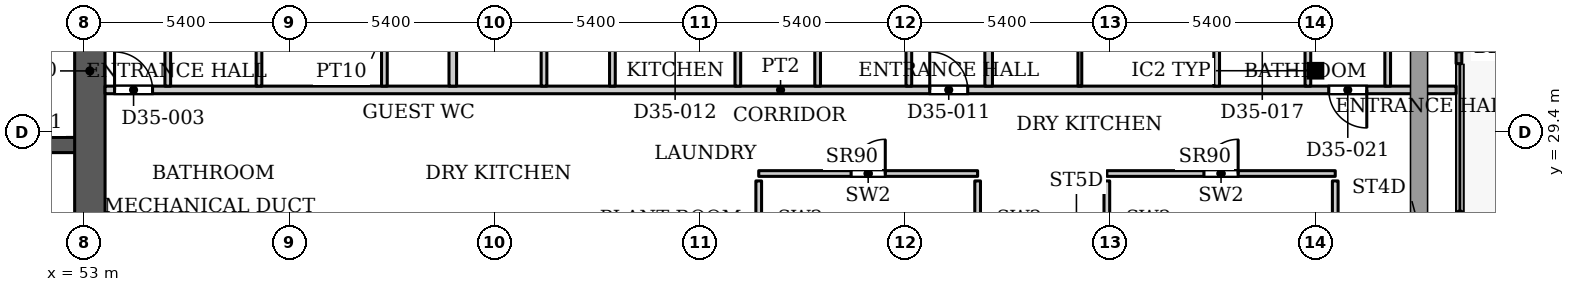
"""IFC4 building model, lengths in metres.
Left out: names, types, materials, properties, quantities, classifications, styles, units other than length and angle.
Written with IfcOpenShell. Run it as: python <this file> out.ifc"""

import sys

from ifc_helpers import new_model, si_unit, direction, frame, frame_2d, origin, origin_2d, place, context, subcontext, project, spatial, rectangle, hollow_rectangle, extrude, source, transform, mapped, element, fill, save


model = new_model("IFC4")
c1 = context("Model", 3, precision=1e-05, world=origin(), true_north=direction((0.0, 1.0)))
c2 = subcontext(c1, "Body", "Model", "MODEL_VIEW")
j1 = project(units=[si_unit("LENGTHUNIT", "METRE"), si_unit("PLANEANGLEUNIT", "RADIAN")], contexts=[c1])
p1 = place(None, origin())
s1 = spatial("IfcSite", under=j1, at=p1, CompositionType="ELEMENT")
p2 = place(p1, origin())
s2 = spatial("IfcBuilding", under=s1, at=p2, CompositionType="ELEMENT")
p3 = place(p2, frame((0.0, 0.0, 156.5)))
s3 = spatial("IfcBuildingStorey", under=s2, at=p3, CompositionType="ELEMENT", Elevation=156.5)
p4 = place(p3, frame((85.4, 31.005, 0.0), z_axis=(0.0, 0.0, 1.0), x_axis=(1.0, 0.0, 0.0)))
e1 = element("IfcColumn", 1, at=p4, inside=s3, PredefinedType="COLUMN", context=c2, shape_type="SweptSolid", body=[
    extrude(hollow_rectangle(XDim=0.305, YDim=0.305, WallThickness=0.016, InnerFilletRadius=0.016, OuterFilletRadius=0.032, at=origin_2d()), origin(), (0.0, 0.0, 1.0), 3.9),
])
p5 = place(p3, frame((34.75, 29.05, 0.0), z_axis=(0.0, 0.0, 1.0), x_axis=(1.0, 0.0, 0.0)))
e2 = element("IfcWall", 2, at=p5, inside=s3, PredefinedType="SHEAR", context=c2, shape_type="SweptSolid", body=[
    extrude(rectangle(XDim=18.4, YDim=0.4, at=frame_2d((9.2, 0.0))), origin(), (0.0, 0.0, 1.0), 3.9),
])
p6 = place(p5, frame((0.875, 0.0, 0.0)))
e3 = element("IfcOpeningElement", 3, at=p6, cuts=e2, PredefinedType="OPENING", context=c2, shape_type="SweptSolid", body=[
    extrude(rectangle(XDim=1.1, YDim=2.2, at=frame_2d((0.55, 1.1))), frame((0.0, 0.21, 0.0), z_axis=(0.0, -1.0, 0.0), x_axis=(1.0, 0.0, 0.0)), (0.0, 0.0, 1.0), 0.42),
])
p7 = place(p5, frame((3.725, 0.0, 0.0)))
e4 = element("IfcOpeningElement", 4, at=p7, cuts=e2, PredefinedType="OPENING", context=c2, shape_type="SweptSolid", body=[
    extrude(rectangle(XDim=1.1, YDim=2.2, at=frame_2d((0.55, 1.1))), frame((0.0, 0.21, 0.0), z_axis=(0.0, -1.0, 0.0), x_axis=(1.0, 0.0, 0.0)), (0.0, 0.0, 1.0), 0.42),
])
p8 = place(p5, frame((6.575, 0.0, 0.0)))
e5 = element("IfcOpeningElement", 5, at=p8, cuts=e2, PredefinedType="OPENING", context=c2, shape_type="SweptSolid", body=[
    extrude(rectangle(XDim=1.1, YDim=2.2, at=frame_2d((0.55, 1.1))), frame((0.0, 0.21, 0.0), z_axis=(0.0, -1.0, 0.0), x_axis=(1.0, 0.0, 0.0)), (0.0, 0.0, 1.0), 0.42),
])
p9 = place(p5, frame((9.425, 0.0, 0.0)))
e6 = element("IfcOpeningElement", 6, at=p9, cuts=e2, PredefinedType="OPENING", context=c2, shape_type="SweptSolid", body=[
    extrude(rectangle(XDim=1.1, YDim=2.2, at=frame_2d((0.55, 1.1))), frame((0.0, 0.21, 0.0), z_axis=(0.0, -1.0, 0.0), x_axis=(1.0, 0.0, 0.0)), (0.0, 0.0, 1.0), 0.42),
])
p10 = place(p5, frame((12.275, 0.0, 0.0)))
e7 = element("IfcOpeningElement", 7, at=p10, cuts=e2, PredefinedType="OPENING", context=c2, shape_type="SweptSolid", body=[
    extrude(rectangle(XDim=1.1, YDim=2.2, at=frame_2d((0.55, 1.1))), frame((0.0, 0.21, 0.0), z_axis=(0.0, -1.0, 0.0), x_axis=(1.0, 0.0, 0.0)), (0.0, 0.0, 1.0), 0.42),
])
p11 = place(p5, frame((15.125, 0.0, 0.0)))
e8 = element("IfcOpeningElement", 8, at=p11, cuts=e2, PredefinedType="OPENING", context=c2, shape_type="SweptSolid", body=[
    extrude(rectangle(XDim=1.1, YDim=2.2, at=frame_2d((0.55, 1.1))), frame((0.0, 0.21, 0.0), z_axis=(0.0, -1.0, 0.0), x_axis=(1.0, 0.0, 0.0)), (0.0, 0.0, 1.0), 0.42),
])
p12 = place(p3, frame((53.15, 25.8, 0.0), z_axis=(0.0, 0.0, 1.0), x_axis=(0.0, 1.0, 0.0)))
e9 = element("IfcWall", 9, at=p12, inside=s3, PredefinedType="SHEAR", context=c2, shape_type="SweptSolid", body=[
    extrude(rectangle(XDim=10.4, YDim=0.8, at=frame_2d((5.2, 0.0))), origin(), (0.0, 0.0, 1.0), 3.9),
])
p13 = place(p3, frame((89.175, 33.591, 0.0), z_axis=(0.0, 0.0, 1.0), x_axis=(0.0, -1.0, 0.0)))
e10 = element("IfcWall", 10, at=p13, inside=s3, PredefinedType="SOLIDWALL", context=c2, shape_type="SweptSolid", body=[
    extrude(rectangle(XDim=2.4, YDim=0.15, at=frame_2d((1.2, 0.0))), origin(), (0.0, 0.0, 1.0), 3.75),
])
p14 = place(p13, frame((0.3, 0.0, 0.0)))
e11 = element("IfcOpeningElement", 11, at=p14, cuts=e10, PredefinedType="OPENING", context=c2, shape_type="SweptSolid", body=[
    extrude(rectangle(XDim=1.8, YDim=2.4, at=frame_2d((0.9, 1.2))), frame((0.0, 0.085, 0.0), z_axis=(0.0, -1.0, 0.0), x_axis=(1.0, 0.0, 0.0)), (0.0, 0.0, 1.0), 0.17),
])
p15 = place(p3, frame((70.75, 28.3, 0.0), z_axis=(0.0, 0.0, 1.0), x_axis=(1.0, 0.0, 0.0)))
e12 = element("IfcWall", 12, at=p15, inside=s3, PredefinedType="PARTITIONING", context=c2, shape_type="SweptSolid", body=[
    extrude(rectangle(XDim=5.76, YDim=0.15, at=frame_2d((2.88, 0.0))), origin(), (0.0, 0.0, 1.0), 3.9),
])
p16 = place(p15, frame((2.43, 0.0, 0.0)))
e13 = element("IfcOpeningElement", 13, at=p16, cuts=e12, PredefinedType="OPENING", context=c2, shape_type="SweptSolid", body=[
    extrude(rectangle(XDim=0.9, YDim=2.2, at=frame_2d((0.45, 1.1))), frame((0.0, 0.085, 0.0), z_axis=(0.0, -1.0, 0.0), x_axis=(1.0, 0.0, 0.0)), (0.0, 0.0, 1.0), 0.17),
])
for number, where, z_axis, x_axis in (
    (14, (70.75, 26.12, 0.0), (0.0, 0.0, 1.0), (0.0, 1.0, 0.0)),
    (15, (76.51, 26.12, 0.0), (0.0, 0.0, 1.0), (0.0, 1.0, 0.0)),
):
    element("IfcWall", number, at=place(p3, frame(where, z_axis=z_axis, x_axis=x_axis)), inside=s3, PredefinedType="PARTITIONING", context=c2, shape_type="SweptSolid", body=[
        extrude(rectangle(XDim=1.985, YDim=0.15, at=frame_2d((0.992, 0.0))), origin(), (0.0, 0.0, 1.0), 3.9),
    ])
p17 = place(p3, frame((79.91, 28.3, 0.0), z_axis=(0.0, 0.0, 1.0), x_axis=(1.0, 0.0, 0.0)))
e16 = element("IfcWall", 16, at=p17, inside=s3, PredefinedType="PARTITIONING", context=c2, shape_type="SweptSolid", body=[
    extrude(rectangle(XDim=6.01, YDim=0.15, at=frame_2d((3.005, 0.0))), origin(), (0.0, 0.0, 1.0), 3.9),
])
p18 = place(p17, frame((2.555, 0.0, 0.0)))
e17 = element("IfcOpeningElement", 17, at=p18, cuts=e16, PredefinedType="OPENING", context=c2, shape_type="SweptSolid", body=[
    extrude(rectangle(XDim=0.9, YDim=2.2, at=frame_2d((0.45, 1.1))), frame((0.0, 0.085, 0.0), z_axis=(0.0, -1.0, 0.0), x_axis=(1.0, 0.0, 0.0)), (0.0, 0.0, 1.0), 0.17),
])
p19 = place(p3, frame((79.91, 26.12, 0.0), z_axis=(0.0, 0.0, 1.0), x_axis=(0.0, 1.0, 0.0)))
e18 = element("IfcWall", 18, at=p19, inside=s3, PredefinedType="PARTITIONING", context=c2, shape_type="SweptSolid", body=[
    extrude(rectangle(XDim=1.985, YDim=0.15, at=frame_2d((0.992, 0.0))), origin(), (0.0, 0.0, 1.0), 3.9),
])
p20 = place(p3, frame((85.92, 25.62, 0.0), z_axis=(0.0, 0.0, 1.0), x_axis=(0.0, 1.0, 0.0)))
e19 = element("IfcWall", 19, at=p20, inside=s3, PredefinedType="PARTITIONING", context=c2, shape_type="SweptSolid", body=[
    extrude(rectangle(XDim=2.485, YDim=0.15, at=frame_2d((1.242, 0.0))), origin(), (0.0, 0.0, 1.0), 3.9),
])
p21 = place(p3, frame((53.549, 30.5, 0.0), z_axis=(0.0, 0.0, 1.0), x_axis=(1.0, 0.0, 0.0)))
e20 = element("IfcWall", 20, at=p21, inside=s3, PredefinedType="PARTITIONING", context=c2, shape_type="SweptSolid", body=[
    extrude(rectangle(XDim=35.551, YDim=0.2, at=frame_2d((17.775, 0.0))), origin(), (0.0, 0.0, 1.0), 3.6),
])
p22 = place(p21, frame((0.251, 0.0, 0.0)))
e21 = element("IfcOpeningElement", 21, at=p22, cuts=e20, PredefinedType="OPENING", context=c2, shape_type="SweptSolid", body=[
    extrude(rectangle(XDim=1.0, YDim=2.1, at=frame_2d((0.5, 1.05))), frame((0.0, 0.11, 0.0), z_axis=(0.0, -1.0, 0.0), x_axis=(1.0, 0.0, 0.0)), (0.0, 0.0, 1.0), 0.22),
])
p23 = place(p21, frame((21.701, 0.0, 0.0)))
e22 = element("IfcOpeningElement", 22, at=p23, cuts=e20, PredefinedType="OPENING", context=c2, shape_type="SweptSolid", body=[
    extrude(rectangle(XDim=1.0, YDim=2.1, at=frame_2d((0.5, 1.05))), frame((0.0, 0.11, 0.0), z_axis=(0.0, -1.0, 0.0), x_axis=(1.0, 0.0, 0.0)), (0.0, 0.0, 1.0), 0.22),
])
p24 = place(p21, frame((32.201, 0.0, 0.0)))
e23 = element("IfcOpeningElement", 23, at=p24, cuts=e20, PredefinedType="OPENING", context=c2, shape_type="SweptSolid", body=[
    extrude(rectangle(XDim=1.0, YDim=2.1, at=frame_2d((0.5, 1.05))), frame((0.0, 0.11, 0.0), z_axis=(0.0, -1.0, 0.0), x_axis=(1.0, 0.0, 0.0)), (0.0, 0.0, 1.0), 0.22),
])
for number, where, z_axis, x_axis in (
    (24, (55.2, 30.6, 0.0), (0.0, 0.0, 1.0), (0.0, 1.0, 0.0)),
    (25, (57.6, 30.6, 0.0), (0.0, 0.0, 1.0), (0.0, 1.0, 0.0)),
    (26, (60.9, 30.6, 0.0), (0.0, 0.0, 1.0), (0.0, 1.0, 0.0)),
):
    element("IfcWall", number, at=place(p3, frame(where, z_axis=z_axis, x_axis=x_axis)), inside=s3, PredefinedType="PARTITIONING", context=c2, shape_type="SweptSolid", body=[
        extrude(rectangle(XDim=3.025, YDim=0.15, at=frame_2d((1.512, 0.0))), origin(), (0.0, 0.0, 1.0), 3.6),
    ])
p25 = place(p3, frame((62.7, 30.6, 0.0), z_axis=(0.0, 0.0, 1.0), x_axis=(0.0, 1.0, 0.0)))
e27 = element("IfcWall", 27, at=p25, inside=s3, PredefinedType="PARTITIONING", context=c2, shape_type="SweptSolid", body=[
    extrude(rectangle(XDim=13.3, YDim=0.2, at=frame_2d((6.65, 0.0))), origin(), (0.0, 0.0, 1.0), 3.6),
])
for number, where, z_axis, x_axis in (
    (28, (65.1, 30.6, 0.0), (0.0, 0.0, 1.0), (0.0, 1.0, 0.0)),
    (29, (66.9, 30.6, 0.0), (0.0, 0.0, 1.0), (0.0, 1.0, 0.0)),
    (30, (70.2, 30.6, 0.0), (0.0, 0.0, 1.0), (0.0, 1.0, 0.0)),
    (31, (72.3, 30.6, 0.0), (0.0, 0.0, 1.0), (0.0, 1.0, 0.0)),
    (32, (74.7, 30.6, 0.0), (0.0, 0.0, 1.0), (0.0, 1.0, 0.0)),
):
    element("IfcWall", number, at=place(p3, frame(where, z_axis=z_axis, x_axis=x_axis)), inside=s3, PredefinedType="PARTITIONING", context=c2, shape_type="SweptSolid", body=[
        extrude(rectangle(XDim=3.025, YDim=0.15, at=frame_2d((1.512, 0.0))), origin(), (0.0, 0.0, 1.0), 3.6),
    ])
p26 = place(p3, frame((76.8, 30.6, 0.0), z_axis=(0.0, 0.0, 1.0), x_axis=(0.0, 1.0, 0.0)))
e33 = element("IfcWall", 33, at=p26, inside=s3, PredefinedType="PARTITIONING", context=c2, shape_type="SweptSolid", body=[
    extrude(rectangle(XDim=13.3, YDim=0.2, at=frame_2d((6.65, 0.0))), origin(), (0.0, 0.0, 1.0), 3.6),
])
p27 = place(p3, frame((79.2, 30.6, 0.0), z_axis=(0.0, 0.0, 1.0), x_axis=(0.0, 1.0, 0.0)))
e34 = element("IfcWall", 34, at=p27, inside=s3, PredefinedType="PARTITIONING", context=c2, shape_type="SweptSolid", body=[
    extrude(rectangle(XDim=3.025, YDim=0.1, at=frame_2d((1.512, 0.0))), origin(), (0.0, 0.0, 1.0), 3.6),
])
p28 = place(p3, frame((82.8, 30.6, 0.0), z_axis=(0.0, 0.0, 1.0), x_axis=(0.0, 1.0, 0.0)))
e35 = element("IfcWall", 35, at=p28, inside=s3, PredefinedType="PARTITIONING", context=c2, shape_type="SweptSolid", body=[
    extrude(rectangle(XDim=3.025, YDim=0.15, at=frame_2d((1.512, 0.0))), origin(), (0.0, 0.0, 1.0), 3.6),
])
p29 = place(p3, frame((85.2, 30.6, 0.0), z_axis=(0.0, 0.0, 1.0), x_axis=(0.0, 1.0, 0.0)))
e36 = element("IfcWall", 36, at=p29, inside=s3, PredefinedType="PARTITIONING", context=c2, shape_type="SweptSolid", body=[
    extrude(rectangle(XDim=3.025, YDim=0.15, at=frame_2d((1.512, 0.0))), origin(), (0.0, 0.0, 1.0), 3.447),
])
p30 = place(p3, frame((87.3, 30.6, 0.0), z_axis=(0.0, 0.0, 1.0), x_axis=(0.0, 1.0, 0.0)))
e37 = element("IfcWall", 37, at=p30, inside=s3, PredefinedType="PARTITIONING", context=c2, shape_type="SweptSolid", body=[
    extrude(rectangle(XDim=3.175, YDim=0.15, at=frame_2d((1.587, 0.0))), origin(), (0.0, 0.0, 1.0), 3.6),
])
m1 = source(origin(), c2, "Body", "SweptSolid", [
    extrude(rectangle(XDim=1.8, YDim=2.4, at=frame_2d((0.9, 1.2))), frame((0.0, 0.025, 0.0), z_axis=(0.0, -1.0, 0.0), x_axis=(1.0, 0.0, 0.0)), (0.0, 0.0, 1.0), 0.05),
])
p31 = place(p14, origin())
e38 = element("IfcDoor", 38, at=p31, inside=s3, OperationType="SLIDING_TO_LEFT", PredefinedType="DOOR", context=c2, shape_type="MappedRepresentation", body=[
    mapped(m1, transform((0.0, 0.0, 0.0), x_axis=(1.0, 0.0, 0.0), y_axis=(0.0, 1.0, 0.0), z_axis=(0.0, 0.0, 1.0), scale=1.0)),
])
fill(e11, e38)
m2 = source(origin(), c2, "Body", "SweptSolid", [
    extrude(rectangle(XDim=0.9, YDim=2.2, at=frame_2d((0.45, 1.1))), frame((0.0, 0.025, 0.0), z_axis=(0.0, -1.0, 0.0), x_axis=(1.0, 0.0, 0.0)), (0.0, 0.0, 1.0), 0.05),
])
p32 = place(p16, origin())
e39 = element("IfcDoor", 39, at=p32, inside=s3, OperationType="SINGLE_SWING_LEFT", PredefinedType="DOOR", context=c2, shape_type="MappedRepresentation", body=[
    mapped(m2, transform((0.0, 0.0, 0.0), x_axis=(1.0, 0.0, 0.0), y_axis=(0.0, 1.0, 0.0), z_axis=(0.0, 0.0, 1.0), scale=1.0)),
])
fill(e13, e39)
p33 = place(p18, origin())
e40 = element("IfcDoor", 40, at=p33, inside=s3, OperationType="SINGLE_SWING_LEFT", PredefinedType="DOOR", context=c2, shape_type="MappedRepresentation", body=[
    mapped(m2, transform((0.0, 0.0, 0.0), x_axis=(1.0, 0.0, 0.0), y_axis=(0.0, 1.0, 0.0), z_axis=(0.0, 0.0, 1.0), scale=1.0)),
])
fill(e17, e40)
m3 = source(origin(), c2, "Body", "SweptSolid", [
    extrude(rectangle(XDim=1.0, YDim=2.1, at=frame_2d((0.5, 1.05))), frame((0.0, 0.025, 0.0), z_axis=(0.0, -1.0, 0.0), x_axis=(1.0, 0.0, 0.0)), (0.0, 0.0, 1.0), 0.05),
])
p34 = place(p22, origin())
e41 = element("IfcDoor", 41, at=p34, inside=s3, OperationType="SINGLE_SWING_LEFT", PredefinedType="DOOR", context=c2, shape_type="MappedRepresentation", body=[
    mapped(m3, transform((0.0, 0.0, 0.0), x_axis=(1.0, 0.0, 0.0), y_axis=(0.0, 1.0, 0.0), z_axis=(0.0, 0.0, 1.0), scale=1.0)),
])
fill(e21, e41)
p35 = place(p23, origin())
e42 = element("IfcDoor", 42, at=p35, inside=s3, OperationType="SINGLE_SWING_LEFT", PredefinedType="DOOR", context=c2, shape_type="MappedRepresentation", body=[
    mapped(m3, transform((0.0, 0.0, 0.0), x_axis=(1.0, 0.0, 0.0), y_axis=(0.0, 1.0, 0.0), z_axis=(0.0, 0.0, 1.0), scale=1.0)),
])
fill(e22, e42)
p36 = place(p24, origin())
e43 = element("IfcDoor", 43, at=p36, inside=s3, OperationType="SINGLE_SWING_RIGHT", PredefinedType="DOOR", context=c2, shape_type="MappedRepresentation", body=[
    mapped(m3, transform((0.0, 0.0, 0.0), x_axis=(1.0, 0.0, 0.0), y_axis=(0.0, 1.0, 0.0), z_axis=(0.0, 0.0, 1.0), scale=1.0)),
])
fill(e23, e43)
save(model, sys.argv[1])
